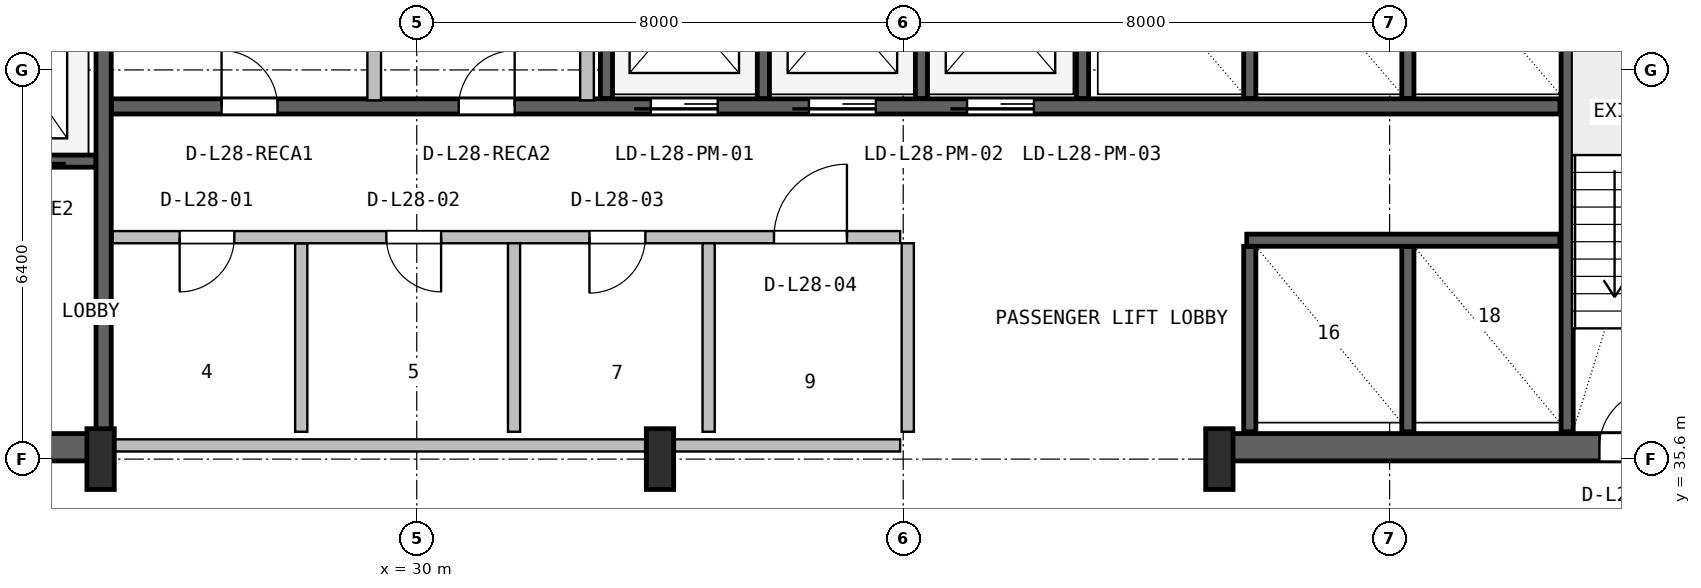
"""IFC4 building model, lengths in metres.
Left out: names, types, materials, properties, quantities, classifications, styles, units other than length and angle.
Written with IfcOpenShell. Run it as: python <this file> out.ifc"""

import sys

from ifc_helpers import new_model, si_unit, direction, frame, frame_2d, origin, origin_2d, place, context, subcontext, project, spatial, rectangle, i_section, extrude, source, transform, mapped, element, fill, save


model = new_model("IFC4")
c1 = context("Model", 3, precision=1e-05, world=origin(), true_north=direction((0.0, 1.0)))
c2 = subcontext(c1, "Body", "Model", "MODEL_VIEW")
j1 = project(units=[si_unit("LENGTHUNIT", "METRE"), si_unit("PLANEANGLEUNIT", "RADIAN")], contexts=[c1])
p1 = place(None, origin())
s1 = spatial("IfcSite", under=j1, at=p1, CompositionType="ELEMENT")
p2 = place(p1, origin())
s2 = spatial("IfcBuilding", under=s1, at=p2, CompositionType="ELEMENT")
p3 = place(p2, frame((0.0, 0.0, 118.2)))
s3 = spatial("IfcBuildingStorey", under=s2, at=p3, CompositionType="ELEMENT", Elevation=118.2)
p4 = place(p3, frame((15.57, 35.795, 0.0), z_axis=(0.0, 0.0, 1.0), x_axis=(1.0, 0.0, 0.0)))
e1 = element("IfcWall", 1, at=p4, inside=s3, PredefinedType="SHEAR", context=c2, shape_type="SweptSolid", body=[
    extrude(rectangle(XDim=9.23, YDim=0.45, at=frame_2d((4.615, 0.0))), origin(), (0.0, 0.0, 1.0), 3.55),
])
p5 = place(p4, frame((5.4, 0.0, 0.0)))
e2 = element("IfcOpeningElement", 2, at=p5, cuts=e1, PredefinedType="OPENING", context=c2, shape_type="SweptSolid", body=[
    extrude(rectangle(XDim=1.0, YDim=2.1, at=frame_2d((0.5, 1.05))), frame((0.0, 0.235, 0.0), z_axis=(0.0, -1.0, 0.0), x_axis=(1.0, 0.0, 0.0)), (0.0, 0.0, 1.0), 0.47),
])
p6 = place(p3, frame((43.2, 35.795, 0.0), z_axis=(0.0, 0.0, 1.0), x_axis=(1.0, 0.0, 0.0)))
e3 = element("IfcWall", 3, at=p6, inside=s3, PredefinedType="SHEAR", context=c2, shape_type="SweptSolid", body=[
    extrude(rectangle(XDim=9.23, YDim=0.45, at=frame_2d((4.615, 0.0))), origin(), (0.0, 0.0, 1.0), 3.55),
])
p7 = place(p6, frame((6.25, 0.0, 0.0)))
e4 = element("IfcOpeningElement", 4, at=p7, cuts=e3, PredefinedType="OPENING", context=c2, shape_type="SweptSolid", body=[
    extrude(rectangle(XDim=0.95, YDim=2.1, at=frame_2d((0.475, 1.05))), frame((0.0, 0.235, 0.0), z_axis=(0.0, -1.0, 0.0), x_axis=(1.0, 0.0, 0.0)), (0.0, 0.0, 1.0), 0.47),
])
m1 = source(origin(), c2, "Body", "SweptSolid", [
    extrude(i_section(OverallWidth=0.45, OverallDepth=1.0, WebThickness=0.016, FlangeThickness=0.03, FilletRadius=0.016, at=origin_2d()), origin(), (0.0, 0.0, 1.0), 3.8),
])
for number, where, z_axis, x_axis in (
    (5, (24.8, 35.6, 0.0), (0.0, 0.0, 1.0), (1.0, 0.0, 0.0)),
    (6, (34.0, 35.6, 0.0), (0.0, 0.0, 1.0), (1.0, 0.0, 0.0)),
    (7, (43.2, 35.6, 0.0), (0.0, 0.0, 1.0), (1.0, 0.0, 0.0)),
):
    element("IfcColumn", number, at=place(p3, frame(where, z_axis=z_axis, x_axis=x_axis)), inside=s3, PredefinedType="COLUMN", context=c2, shape_type="MappedRepresentation", body=[
        mapped(m1, transform((0.0, 0.0, 0.0), x_axis=(1.0, 0.0, 0.0), y_axis=(0.0, 1.0, 0.0), z_axis=(0.0, 0.0, 1.0), scale=1.0)),
    ])
p8 = place(p3, frame((24.85, 36.05, 0.0), z_axis=(0.0, 0.0, 1.0), x_axis=(0.0, 1.0, 0.0)))
e8 = element("IfcWall", 8, at=p8, inside=s3, PredefinedType="SHEAR", context=c2, shape_type="SweptSolid", body=[
    extrude(rectangle(XDim=10.45, YDim=0.25, at=frame_2d((5.225, 0.0))), origin(), (0.0, 0.0, 1.0), 3.55),
])
p9 = place(p3, frame((19.2, 40.5, 0.0), z_axis=(0.0, 0.0, 1.0), x_axis=(1.0, 0.0, 0.0)))
e9 = element("IfcWall", 9, at=p9, inside=s3, PredefinedType="SHEAR", context=c2, shape_type="SweptSolid", body=[
    extrude(rectangle(XDim=5.52, YDim=0.2, at=frame_2d((2.76, 0.0))), origin(), (0.0, 0.0, 1.0), 3.55),
])
p10 = place(p9, frame((1.05, 0.0, 0.0)))
e10 = element("IfcOpeningElement", 10, at=p10, cuts=e9, PredefinedType="OPENING", context=c2, shape_type="SweptSolid", body=[
    extrude(rectangle(XDim=1.1, YDim=2.18, at=frame_2d((0.55, 1.09))), frame((0.0, 0.11, 0.0), z_axis=(0.0, -1.0, 0.0), x_axis=(1.0, 0.0, 0.0)), (0.0, 0.0, 1.0), 0.22),
])
p11 = place(p9, frame((3.65, 0.0, 0.0)))
e11 = element("IfcOpeningElement", 11, at=p11, cuts=e9, PredefinedType="OPENING", context=c2, shape_type="SweptSolid", body=[
    extrude(rectangle(XDim=1.1, YDim=2.18, at=frame_2d((0.55, 1.09))), frame((0.0, 0.11, 0.0), z_axis=(0.0, -1.0, 0.0), x_axis=(1.0, 0.0, 0.0)), (0.0, 0.0, 1.0), 0.22),
])
p12 = place(p3, frame((48.92, 36.05, 0.0), z_axis=(0.0, 0.0, 1.0), x_axis=(0.0, 1.0, 0.0)))
e12 = element("IfcWall", 12, at=p12, inside=s3, PredefinedType="SHEAR", context=c2, shape_type="SweptSolid", body=[
    extrude(rectangle(XDim=10.5, YDim=0.2, at=frame_2d((5.25, 0.0))), origin(), (0.0, 0.0, 1.0), 3.55),
])
p13 = place(p3, frame((24.98, 41.4, 0.0), z_axis=(0.0, 0.0, 1.0), x_axis=(1.0, 0.0, 0.0)))
e13 = element("IfcWall", 13, at=p13, inside=s3, PredefinedType="SHEAR", context=c2, shape_type="SweptSolid", body=[
    extrude(rectangle(XDim=23.82, YDim=0.25, at=frame_2d((11.91, 0.0))), origin(), (0.0, 0.0, 1.0), 3.55),
])
p14 = place(p13, frame((8.87, 0.0, 0.0)))
e14 = element("IfcOpeningElement", 14, at=p14, cuts=e13, PredefinedType="OPENING", context=c2, shape_type="SweptSolid", body=[
    extrude(rectangle(XDim=1.1, YDim=2.18, at=frame_2d((0.55, 1.09))), frame((0.0, 0.135, 0.0), z_axis=(0.0, -1.0, 0.0), x_axis=(1.0, 0.0, 0.0)), (0.0, 0.0, 1.0), 0.27),
])
p15 = place(p13, frame((11.47, 0.0, 0.0)))
e15 = element("IfcOpeningElement", 15, at=p15, cuts=e13, PredefinedType="OPENING", context=c2, shape_type="SweptSolid", body=[
    extrude(rectangle(XDim=1.1, YDim=2.18, at=frame_2d((0.55, 1.09))), frame((0.0, 0.135, 0.0), z_axis=(0.0, -1.0, 0.0), x_axis=(1.0, 0.0, 0.0)), (0.0, 0.0, 1.0), 0.27),
])
p16 = place(p13, frame((14.07, 0.0, 0.0)))
e16 = element("IfcOpeningElement", 16, at=p16, cuts=e13, PredefinedType="OPENING", context=c2, shape_type="SweptSolid", body=[
    extrude(rectangle(XDim=1.1, YDim=2.18, at=frame_2d((0.55, 1.09))), frame((0.0, 0.135, 0.0), z_axis=(0.0, -1.0, 0.0), x_axis=(1.0, 0.0, 0.0)), (0.0, 0.0, 1.0), 0.27),
])
p17 = place(p13, frame((1.81, 0.0, 0.0)))
e17 = element("IfcOpeningElement", 17, at=p17, cuts=e13, PredefinedType="OPENING", context=c2, shape_type="SweptSolid", body=[
    extrude(rectangle(XDim=0.92, YDim=2.08, at=frame_2d((0.46, 1.04))), frame((0.0, 0.135, 0.0), z_axis=(0.0, -1.0, 0.0), x_axis=(1.0, 0.0, 0.0)), (0.0, 0.0, 1.0), 0.27),
])
p18 = place(p13, frame((5.71, 0.0, 0.0)))
e18 = element("IfcOpeningElement", 18, at=p18, cuts=e13, PredefinedType="OPENING", context=c2, shape_type="SweptSolid", body=[
    extrude(rectangle(XDim=0.92, YDim=2.08, at=frame_2d((0.46, 1.04))), frame((0.0, 0.135, 0.0), z_axis=(0.0, -1.0, 0.0), x_axis=(1.0, 0.0, 0.0)), (0.0, 0.0, 1.0), 0.27),
])
p19 = place(p3, frame((33.12, 41.53, 0.0), z_axis=(0.0, 0.0, 1.0), x_axis=(0.0, 1.0, 0.0)))
e19 = element("IfcWall", 19, at=p19, inside=s3, PredefinedType="SHEAR", context=c2, shape_type="SweptSolid", body=[
    extrude(rectangle(XDim=5.02, YDim=0.2, at=frame_2d((2.51, 0.0))), origin(), (0.0, 0.0, 1.0), 3.55),
])
for number, where, z_axis, x_axis in (
    (20, (35.7, 41.53, 0.0), (0.0, 0.0, 1.0), (0.0, 1.0, 0.0)),
    (21, (38.3, 41.53, 0.0), (0.0, 0.0, 1.0), (0.0, 1.0, 0.0)),
):
    element("IfcWall", number, at=place(p3, frame(where, z_axis=z_axis, x_axis=x_axis)), inside=s3, PredefinedType="SHEAR", context=c2, shape_type="SweptSolid", body=[
        extrude(rectangle(XDim=2.87, YDim=0.2, at=frame_2d((1.435, 0.0))), origin(), (0.0, 0.0, 1.0), 3.55),
    ])
p20 = place(p3, frame((40.95, 41.53, 0.0), z_axis=(0.0, 0.0, 1.0), x_axis=(0.0, 1.0, 0.0)))
e22 = element("IfcWall", 22, at=p20, inside=s3, PredefinedType="SHEAR", context=c2, shape_type="SweptSolid", body=[
    extrude(rectangle(XDim=5.02, YDim=0.2, at=frame_2d((2.51, 0.0))), origin(), (0.0, 0.0, 1.0), 3.55),
])
for number, where, z_axis, x_axis in (
    (23, (43.7, 41.53, 0.0), (0.0, 0.0, 1.0), (0.0, 1.0, 0.0)),
    (24, (46.3, 41.53, 0.0), (0.0, 0.0, 1.0), (0.0, 1.0, 0.0)),
):
    element("IfcWall", number, at=place(p3, frame(where, z_axis=z_axis, x_axis=x_axis)), inside=s3, PredefinedType="SHEAR", context=c2, shape_type="SweptSolid", body=[
        extrude(rectangle(XDim=2.87, YDim=0.2, at=frame_2d((1.435, 0.0))), origin(), (0.0, 0.0, 1.0), 3.55),
    ])
for number, where, z_axis, x_axis in (
    (25, (43.7, 36.05, 0.0), (0.0, 0.0, 1.0), (0.0, 1.0, 0.0)),
    (26, (46.3, 36.05, 0.0), (0.0, 0.0, 1.0), (0.0, 1.0, 0.0)),
):
    element("IfcWall", number, at=place(p3, frame(where, z_axis=z_axis, x_axis=x_axis)), inside=s3, PredefinedType="SHEAR", context=c2, shape_type="SweptSolid", body=[
        extrude(rectangle(XDim=3.05, YDim=0.2, at=frame_2d((1.525, 0.0))), origin(), (0.0, 0.0, 1.0), 3.55),
    ])
p21 = place(p3, frame((43.65, 39.2, 0.0), z_axis=(0.0, 0.0, 1.0), x_axis=(1.0, 0.0, 0.0)))
e27 = element("IfcWall", 27, at=p21, inside=s3, PredefinedType="SHEAR", context=c2, shape_type="SweptSolid", body=[
    extrude(rectangle(XDim=5.15, YDim=0.2, at=frame_2d((2.575, 0.0))), origin(), (0.0, 0.0, 1.0), 3.55),
])
p22 = place(p3, frame((25.0, 35.825, 0.0), z_axis=(0.0, 0.0, 1.0), x_axis=(1.0, 0.0, 0.0)))
e28 = element("IfcWall", 28, at=p22, inside=s3, PredefinedType="SOLIDWALL", context=c2, shape_type="SweptSolid", body=[
    extrude(rectangle(XDim=12.95, YDim=0.2, at=frame_2d((6.475, 0.0))), origin(), (0.0, 0.0, 1.0), 2.325),
])
p23 = place(p3, frame((28.1, 36.05, 0.0), z_axis=(0.0, 0.0, 1.0), x_axis=(0.0, 1.0, 0.0)))
e29 = element("IfcWall", 29, at=p23, inside=s3, PredefinedType="PLUMBINGWALL", context=c2, shape_type="SweptSolid", body=[
    extrude(rectangle(XDim=3.1, YDim=0.2, at=frame_2d((1.55, 0.0))), origin(), (0.0, 0.0, 1.0), 3.53),
])
p24 = place(p3, frame((25.0, 39.25, 0.0), z_axis=(0.0, 0.0, 1.0), x_axis=(1.0, 0.0, 0.0)))
e30 = element("IfcWall", 30, at=p24, inside=s3, PredefinedType="SOLIDWALL", context=c2, shape_type="SweptSolid", body=[
    extrude(rectangle(XDim=12.95, YDim=0.2, at=frame_2d((6.475, 0.0))), origin(), (0.0, 0.0, 1.0), 3.53),
])
p25 = place(p24, frame((1.1, 0.0, 0.0)))
e31 = element("IfcOpeningElement", 31, at=p25, cuts=e30, PredefinedType="OPENING", context=c2, shape_type="SweptSolid", body=[
    extrude(rectangle(XDim=0.9, YDim=2.06, at=frame_2d((0.45, 1.03))), frame((0.0, 0.11, 0.0), z_axis=(0.0, -1.0, 0.0), x_axis=(1.0, 0.0, 0.0)), (0.0, 0.0, 1.0), 0.22),
])
p26 = place(p24, frame((4.5, 0.0, 0.0)))
e32 = element("IfcOpeningElement", 32, at=p26, cuts=e30, PredefinedType="OPENING", context=c2, shape_type="SweptSolid", body=[
    extrude(rectangle(XDim=0.9, YDim=2.06, at=frame_2d((0.45, 1.03))), frame((0.0, 0.11, 0.0), z_axis=(0.0, -1.0, 0.0), x_axis=(1.0, 0.0, 0.0)), (0.0, 0.0, 1.0), 0.22),
])
p27 = place(p24, frame((7.84, 0.0, 0.0)))
e33 = element("IfcOpeningElement", 33, at=p27, cuts=e30, PredefinedType="OPENING", context=c2, shape_type="SweptSolid", body=[
    extrude(rectangle(XDim=0.92, YDim=2.08, at=frame_2d((0.46, 1.04))), frame((0.0, 0.11, 0.0), z_axis=(0.0, -1.0, 0.0), x_axis=(1.0, 0.0, 0.0)), (0.0, 0.0, 1.0), 0.22),
])
p28 = place(p24, frame((10.875, 0.0, 0.0)))
e34 = element("IfcOpeningElement", 34, at=p28, cuts=e30, PredefinedType="OPENING", context=c2, shape_type="SweptSolid", body=[
    extrude(rectangle(XDim=1.2, YDim=2.1, at=frame_2d((0.6, 1.05))), frame((0.0, 0.11, 0.0), z_axis=(0.0, -1.0, 0.0), x_axis=(1.0, 0.0, 0.0)), (0.0, 0.0, 1.0), 0.22),
])
p29 = place(p3, frame((31.6, 36.05, 0.0), z_axis=(0.0, 0.0, 1.0), x_axis=(0.0, 1.0, 0.0)))
e35 = element("IfcWall", 35, at=p29, inside=s3, PredefinedType="PLUMBINGWALL", context=c2, shape_type="SweptSolid", body=[
    extrude(rectangle(XDim=3.1, YDim=0.2, at=frame_2d((1.55, 0.0))), origin(), (0.0, 0.0, 1.0), 3.53),
])
for number, where, z_axis, x_axis in (
    (36, (34.8, 36.05, 0.0), (0.0, 0.0, 1.0), (0.0, 1.0, 0.0)),
    (37, (38.075, 36.05, 0.0), (0.0, 0.0, 1.0), (0.0, 1.0, 0.0)),
):
    element("IfcWall", number, at=place(p3, frame(where, z_axis=z_axis, x_axis=x_axis)), inside=s3, PredefinedType="SOLIDWALL", context=c2, shape_type="SweptSolid", body=[
        extrude(rectangle(XDim=3.1, YDim=0.2, at=frame_2d((1.55, 0.0))), origin(), (0.0, 0.0, 1.0), 3.53),
    ])
p30 = place(p3, frame((29.3, 41.5, 0.0), z_axis=(0.0, 0.0, 1.0), x_axis=(0.0, 1.0, 0.0)))
e38 = element("IfcWall", 38, at=p30, inside=s3, PredefinedType="PARTITIONING", context=c2, shape_type="SweptSolid", body=[
    extrude(rectangle(XDim=2.288, YDim=0.225, at=frame_2d((1.144, 0.0))), origin(), (0.0, 0.0, 1.0), 3.53),
])
p31 = place(p3, frame((32.8, 41.5, 0.0), z_axis=(0.0, 0.0, 1.0), x_axis=(0.0, 1.0, 0.0)))
e39 = element("IfcWall", 39, at=p31, inside=s3, PredefinedType="PARTITIONING", context=c2, shape_type="SweptSolid", body=[
    extrude(rectangle(XDim=5.02, YDim=0.225, at=frame_2d((2.51, 0.0))), origin(), (0.0, 0.0, 1.0), 3.53),
])
m2 = source(origin(), c2, "Body", "SweptSolid", [
    extrude(rectangle(XDim=0.95, YDim=2.1, at=frame_2d((0.475, 1.05))), frame((0.0, 0.025, 0.0), z_axis=(0.0, -1.0, 0.0), x_axis=(1.0, 0.0, 0.0)), (0.0, 0.0, 1.0), 0.05),
])
p32 = place(p7, origin())
e40 = element("IfcDoor", 40, at=p32, inside=s3, OperationType="SINGLE_SWING_RIGHT", PredefinedType="DOOR", context=c2, shape_type="MappedRepresentation", body=[
    mapped(m2, transform((0.0, 0.0, 0.0), x_axis=(1.0, 0.0, 0.0), y_axis=(0.0, 1.0, 0.0), z_axis=(0.0, 0.0, 1.0), scale=1.0)),
])
fill(e4, e40)
m3 = source(origin(), c2, "Body", "SweptSolid", [
    extrude(rectangle(XDim=1.1, YDim=2.18, at=frame_2d((0.55, 1.09))), frame((0.0, 0.025, 0.0), z_axis=(0.0, -1.0, 0.0), x_axis=(1.0, 0.0, 0.0)), (0.0, 0.0, 1.0), 0.05),
])
p33 = place(p14, frame((1.1, 0.0, 0.0), z_axis=(0.0, 0.0, 1.0), x_axis=(-1.0, 0.0, 0.0)))
e41 = element("IfcDoor", 41, at=p33, inside=s3, OperationType="SLIDING_TO_LEFT", PredefinedType="DOOR", context=c2, shape_type="MappedRepresentation", body=[
    mapped(m3, transform((0.0, 0.0, 0.0), x_axis=(1.0, 0.0, 0.0), y_axis=(0.0, 1.0, 0.0), z_axis=(0.0, 0.0, 1.0), scale=1.0)),
])
fill(e14, e41)
p34 = place(p15, frame((1.1, 0.0, 0.0), z_axis=(0.0, 0.0, 1.0), x_axis=(-1.0, 0.0, 0.0)))
e42 = element("IfcDoor", 42, at=p34, inside=s3, OperationType="SLIDING_TO_LEFT", PredefinedType="DOOR", context=c2, shape_type="MappedRepresentation", body=[
    mapped(m3, transform((0.0, 0.0, 0.0), x_axis=(1.0, 0.0, 0.0), y_axis=(0.0, 1.0, 0.0), z_axis=(0.0, 0.0, 1.0), scale=1.0)),
])
fill(e15, e42)
p35 = place(p16, frame((1.1, 0.0, 0.0), z_axis=(0.0, 0.0, 1.0), x_axis=(-1.0, 0.0, 0.0)))
e43 = element("IfcDoor", 43, at=p35, inside=s3, OperationType="SLIDING_TO_LEFT", PredefinedType="DOOR", context=c2, shape_type="MappedRepresentation", body=[
    mapped(m3, transform((0.0, 0.0, 0.0), x_axis=(1.0, 0.0, 0.0), y_axis=(0.0, 1.0, 0.0), z_axis=(0.0, 0.0, 1.0), scale=1.0)),
])
fill(e16, e43)
m4 = source(origin(), c2, "Body", "SweptSolid", [
    extrude(rectangle(XDim=0.92, YDim=2.08, at=frame_2d((0.46, 1.04))), frame((0.0, 0.025, 0.0), z_axis=(0.0, -1.0, 0.0), x_axis=(1.0, 0.0, 0.0)), (0.0, 0.0, 1.0), 0.05),
])
p36 = place(p17, origin())
e44 = element("IfcDoor", 44, at=p36, inside=s3, OperationType="SINGLE_SWING_LEFT", PredefinedType="DOOR", context=c2, shape_type="MappedRepresentation", body=[
    mapped(m4, transform((0.0, 0.0, 0.0), x_axis=(1.0, 0.0, 0.0), y_axis=(0.0, 1.0, 0.0), z_axis=(0.0, 0.0, 1.0), scale=1.0)),
])
fill(e17, e44)
p37 = place(p18, origin())
e45 = element("IfcDoor", 45, at=p37, inside=s3, OperationType="SINGLE_SWING_RIGHT", PredefinedType="DOOR", context=c2, shape_type="MappedRepresentation", body=[
    mapped(m4, transform((0.0, 0.0, 0.0), x_axis=(1.0, 0.0, 0.0), y_axis=(0.0, 1.0, 0.0), z_axis=(0.0, 0.0, 1.0), scale=1.0)),
])
fill(e18, e45)
m5 = source(origin(), c2, "Body", "SweptSolid", [
    extrude(rectangle(XDim=0.9, YDim=2.06, at=frame_2d((0.45, 1.03))), frame((0.0, 0.025, 0.0), z_axis=(0.0, -1.0, 0.0), x_axis=(1.0, 0.0, 0.0)), (0.0, 0.0, 1.0), 0.05),
])
p38 = place(p25, frame((0.9, 0.0, 0.0), z_axis=(0.0, 0.0, 1.0), x_axis=(-1.0, 0.0, 0.0)))
e46 = element("IfcDoor", 46, at=p38, inside=s3, OperationType="SINGLE_SWING_LEFT", PredefinedType="DOOR", context=c2, shape_type="MappedRepresentation", body=[
    mapped(m5, transform((0.0, 0.0, 0.0), x_axis=(1.0, 0.0, 0.0), y_axis=(0.0, 1.0, 0.0), z_axis=(0.0, 0.0, 1.0), scale=1.0)),
])
fill(e31, e46)
p39 = place(p26, frame((0.9, 0.0, 0.0), z_axis=(0.0, 0.0, 1.0), x_axis=(-1.0, 0.0, 0.0)))
e47 = element("IfcDoor", 47, at=p39, inside=s3, OperationType="SINGLE_SWING_RIGHT", PredefinedType="DOOR", context=c2, shape_type="MappedRepresentation", body=[
    mapped(m5, transform((0.0, 0.0, 0.0), x_axis=(1.0, 0.0, 0.0), y_axis=(0.0, 1.0, 0.0), z_axis=(0.0, 0.0, 1.0), scale=1.0)),
])
fill(e32, e47)
p40 = place(p27, frame((0.92, 0.0, 0.0), z_axis=(0.0, 0.0, 1.0), x_axis=(-1.0, 0.0, 0.0)))
e48 = element("IfcDoor", 48, at=p40, inside=s3, OperationType="SINGLE_SWING_LEFT", PredefinedType="DOOR", context=c2, shape_type="MappedRepresentation", body=[
    mapped(m4, transform((0.0, 0.0, 0.0), x_axis=(1.0, 0.0, 0.0), y_axis=(0.0, 1.0, 0.0), z_axis=(0.0, 0.0, 1.0), scale=1.0)),
])
fill(e33, e48)
m6 = source(origin(), c2, "Body", "SweptSolid", [
    extrude(rectangle(XDim=1.2, YDim=2.1, at=frame_2d((0.6, 1.05))), frame((0.0, 0.025, 0.0), z_axis=(0.0, -1.0, 0.0), x_axis=(1.0, 0.0, 0.0)), (0.0, 0.0, 1.0), 0.05),
])
p41 = place(p28, origin())
e49 = element("IfcDoor", 49, at=p41, inside=s3, OperationType="SINGLE_SWING_RIGHT", PredefinedType="DOOR", context=c2, shape_type="MappedRepresentation", body=[
    mapped(m6, transform((0.0, 0.0, 0.0), x_axis=(1.0, 0.0, 0.0), y_axis=(0.0, 1.0, 0.0), z_axis=(0.0, 0.0, 1.0), scale=1.0)),
])
fill(e34, e49)
save(model, sys.argv[1])
